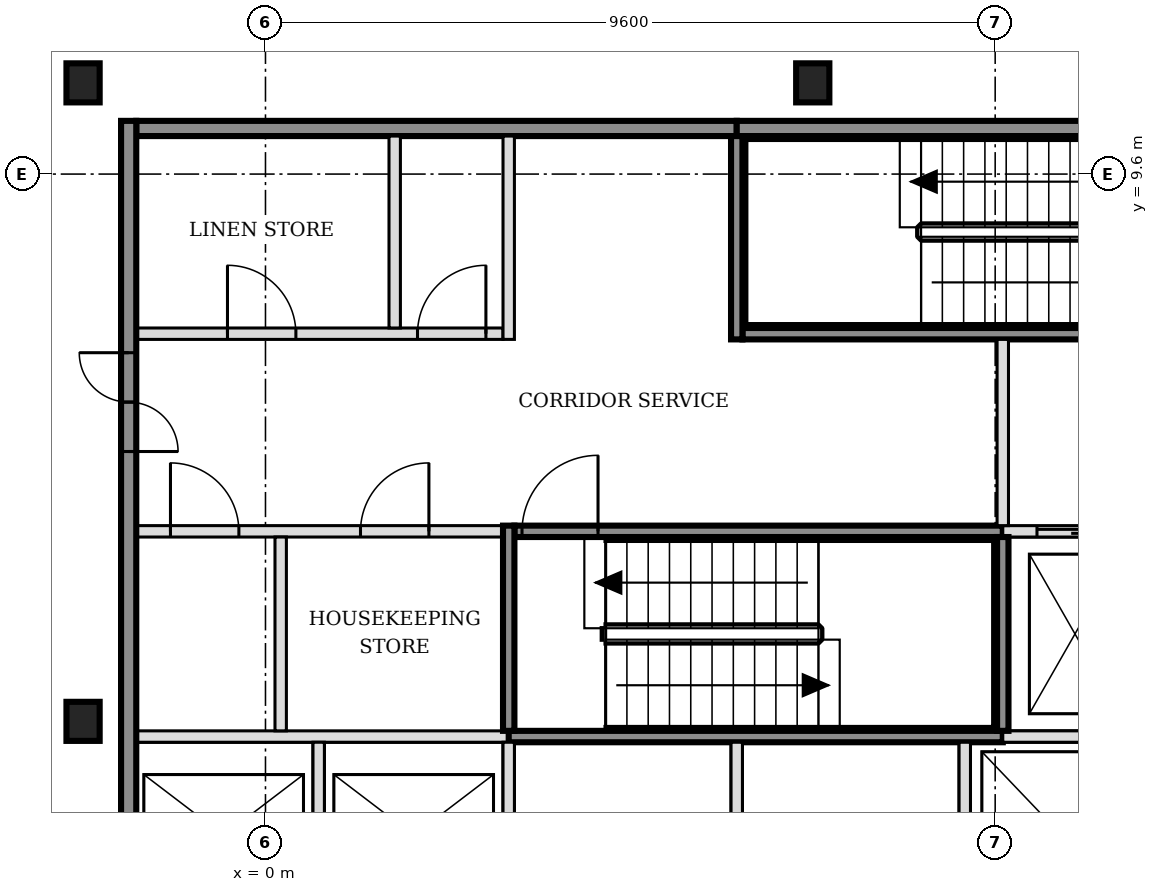
"""IFC4 building model, lengths in metres.
Left out: names, types, materials, properties, quantities, classifications, styles, units other than length and angle.
Written with IfcOpenShell. Run it as: python <this file> out.ifc"""

import sys

from ifc_helpers import new_model, si_unit, direction, frame, frame_2d, origin, origin_2d, place, context, subcontext, project, spatial, rectangle, i_section, extrude, element, fill, save


model = new_model("IFC4")
c1 = context("Model", 3, precision=1e-05, world=origin(), true_north=direction((0.0, 1.0)))
c2 = subcontext(c1, "Body", "Model", "MODEL_VIEW")
j1 = project(units=[si_unit("LENGTHUNIT", "METRE"), si_unit("PLANEANGLEUNIT", "RADIAN")], contexts=[c1])
p1 = place(None, origin())
s1 = spatial("IfcSite", under=j1, at=p1, CompositionType="ELEMENT")
p2 = place(p1, origin())
s2 = spatial("IfcBuilding", under=s1, at=p2, CompositionType="ELEMENT")
p3 = place(p2, frame((0.0, 0.0, 83.4)))
s3 = spatial("IfcBuildingStorey", under=s2, at=p3, CompositionType="ELEMENT", Elevation=83.4)
for number, where, z_axis, x_axis in (
    (1, (-2.4, 2.4, -0.15), (0.0, 0.0, 1.0), (1.0, 0.0, 0.0)),
    (2, (-2.4, 10.8, -0.15), (0.0, 0.0, 1.0), (1.0, 0.0, 0.0)),
    (3, (7.2, 10.8, -0.15), (0.0, 0.0, 1.0), (1.0, 0.0, 0.0)),
):
    element("IfcColumn", number, at=place(p3, frame(where, z_axis=z_axis, x_axis=x_axis)), inside=s3, PredefinedType="COLUMN", context=c2, shape_type="SweptSolid", body=[
        extrude(i_section(OverallWidth=0.437, OverallDepth=0.514, WebThickness=0.061, FlangeThickness=0.097, FilletRadius=0.015, at=origin_2d()), origin(), (0.0, 0.0, 1.0), 3.6),
    ])
p4 = place(p3, frame((-1.7, 2.2, 0.0), z_axis=(0.0, 0.0, 1.0), x_axis=(1.0, 0.0, 0.0)))
e4 = element("IfcWall", 4, at=p4, inside=s3, PredefinedType="SOLIDWALL", context=c2, shape_type="SweptSolid", body=[
    extrude(rectangle(XDim=4.9, YDim=0.15, at=frame_2d((2.45, 0.0))), origin(), (0.0, 0.0, 1.0), 3.45),
])
p5 = place(p3, frame((3.2, 2.2, 0.0), z_axis=(0.0, 0.0, 1.0), x_axis=(1.0, 0.0, 0.0)))
e5 = element("IfcWall", 5, at=p5, inside=s3, PredefinedType="SOLIDWALL", context=c2, shape_type="SweptSolid", body=[
    extrude(rectangle(XDim=6.5, YDim=0.15, at=frame_2d((3.25, 0.0))), origin(), (0.0, 0.0, 1.0), 3.45),
])
p6 = place(p3, frame((9.7, 2.2, 0.0), z_axis=(0.0, 0.0, 1.0), x_axis=(1.0, 0.0, 0.0)))
e6 = element("IfcWall", 6, at=p6, inside=s3, PredefinedType="SOLIDWALL", context=c2, shape_type="SweptSolid", body=[
    extrude(rectangle(XDim=4.525, YDim=0.15, at=frame_2d((2.263, 0.0))), origin(), (0.0, 0.0, 1.0), 3.45),
])
p7 = place(p3, frame((-1.7, 4.9, 0.0), z_axis=(0.0, 0.0, 1.0), x_axis=(1.0, 0.0, 0.0)))
e7 = element("IfcWall", 7, at=p7, inside=s3, PredefinedType="PARTITIONING", context=c2, shape_type="SweptSolid", body=[
    extrude(rectangle(XDim=4.825, YDim=0.15, at=frame_2d((2.413, 0.0))), origin(), (0.0, 0.0, 1.0), 3.45),
])
p8 = place(p7, frame((0.45, 0.0, 0.0)))
e8 = element("IfcOpeningElement", 8, at=p8, cuts=e7, PredefinedType="OPENING", context=c2, shape_type="SweptSolid", body=[
    extrude(rectangle(XDim=0.9, YDim=2.1, at=frame_2d((0.45, 1.05))), frame((0.0, 0.085, 0.0), z_axis=(0.0, -1.0, 0.0), x_axis=(1.0, 0.0, 0.0)), (0.0, 0.0, 1.0), 0.17),
])
p9 = place(p7, frame((2.95, 0.0, 0.0)))
e9 = element("IfcOpeningElement", 9, at=p9, cuts=e7, PredefinedType="OPENING", context=c2, shape_type="SweptSolid", body=[
    extrude(rectangle(XDim=0.9, YDim=2.1, at=frame_2d((0.45, 1.05))), frame((0.0, 0.085, 0.0), z_axis=(0.0, -1.0, 0.0), x_axis=(1.0, 0.0, 0.0)), (0.0, 0.0, 1.0), 0.17),
])
p10 = place(p3, frame((3.275, 4.9, 0.0), z_axis=(0.0, 0.0, 1.0), x_axis=(1.0, 0.0, 0.0)))
e10 = element("IfcWall", 10, at=p10, inside=s3, PredefinedType="SOLIDWALL", context=c2, shape_type="SweptSolid", body=[
    extrude(rectangle(XDim=6.425, YDim=0.15, at=frame_2d((3.212, 0.0))), origin(), (0.0, 0.0, 1.0), 3.45),
])
p11 = place(p10, frame((0.1, 0.0, 0.0)))
e11 = element("IfcOpeningElement", 11, at=p11, cuts=e10, PredefinedType="OPENING", context=c2, shape_type="SweptSolid", body=[
    extrude(rectangle(XDim=1.0, YDim=2.1, at=frame_2d((0.5, 1.05))), frame((0.0, 0.085, 0.0), z_axis=(0.0, -1.0, 0.0), x_axis=(1.0, 0.0, 0.0)), (0.0, 0.0, 1.0), 0.17),
])
p12 = place(p3, frame((9.7, 4.9, 0.0), z_axis=(0.0, 0.0, 1.0), x_axis=(1.0, 0.0, 0.0)))
e12 = element("IfcWall", 12, at=p12, inside=s3, PredefinedType="SOLIDWALL", context=c2, shape_type="SweptSolid", body=[
    extrude(rectangle(XDim=6.4, YDim=0.15, at=frame_2d((3.2, 0.0))), origin(), (0.0, 0.0, 1.0), 3.45),
])
p13 = place(p12, frame((0.45, 0.0, 0.0)))
e13 = element("IfcOpeningElement", 13, at=p13, cuts=e12, PredefinedType="OPENING", context=c2, shape_type="SweptSolid", body=[
    extrude(rectangle(XDim=1.0, YDim=2.1, at=frame_2d((0.5, 1.05))), frame((0.0, 0.085, 0.0), z_axis=(0.0, -1.0, 0.0), x_axis=(1.0, 0.0, 0.0)), (0.0, 0.0, 1.0), 0.17),
])
p14 = place(p12, frame((2.35, 0.0, 0.0)))
e14 = element("IfcOpeningElement", 14, at=p14, cuts=e12, PredefinedType="OPENING", context=c2, shape_type="SweptSolid", body=[
    extrude(rectangle(XDim=1.0, YDim=2.1, at=frame_2d((0.5, 1.05))), frame((0.0, 0.085, 0.0), z_axis=(0.0, -1.0, 0.0), x_axis=(1.0, 0.0, 0.0)), (0.0, 0.0, 1.0), 0.17),
])
p15 = place(p12, frame((4.7, 0.0, 0.0)))
e15 = element("IfcOpeningElement", 15, at=p15, cuts=e12, PredefinedType="OPENING", context=c2, shape_type="SweptSolid", body=[
    extrude(rectangle(XDim=0.9, YDim=2.1, at=frame_2d((0.45, 1.05))), frame((0.0, 0.085, 0.0), z_axis=(0.0, -1.0, 0.0), x_axis=(1.0, 0.0, 0.0)), (0.0, 0.0, 1.0), 0.17),
])
p16 = place(p3, frame((-1.7, 7.5, 0.0), z_axis=(0.0, 0.0, 1.0), x_axis=(1.0, 0.0, 0.0)))
e16 = element("IfcWall", 16, at=p16, inside=s3, PredefinedType="PARTITIONING", context=c2, shape_type="SweptSolid", body=[
    extrude(rectangle(XDim=4.825, YDim=0.15, at=frame_2d((2.413, 0.0))), origin(), (0.0, 0.0, 1.0), 3.45),
])
p17 = place(p16, frame((1.2, 0.0, 0.0)))
e17 = element("IfcOpeningElement", 17, at=p17, cuts=e16, PredefinedType="OPENING", context=c2, shape_type="SweptSolid", body=[
    extrude(rectangle(XDim=0.9, YDim=2.1, at=frame_2d((0.45, 1.05))), frame((0.0, 0.085, 0.0), z_axis=(0.0, -1.0, 0.0), x_axis=(1.0, 0.0, 0.0)), (0.0, 0.0, 1.0), 0.17),
])
p18 = place(p16, frame((3.7, 0.0, 0.0)))
e18 = element("IfcOpeningElement", 18, at=p18, cuts=e16, PredefinedType="OPENING", context=c2, shape_type="SweptSolid", body=[
    extrude(rectangle(XDim=0.9, YDim=2.1, at=frame_2d((0.45, 1.05))), frame((0.0, 0.085, 0.0), z_axis=(0.0, -1.0, 0.0), x_axis=(1.0, 0.0, 0.0)), (0.0, 0.0, 1.0), 0.17),
])
p19 = place(p3, frame((6.275, 7.5, 0.0), z_axis=(0.0, 0.0, 1.0), x_axis=(1.0, 0.0, 0.0)))
e19 = element("IfcWall", 19, at=p19, inside=s3, PredefinedType="SOLIDWALL", context=c2, shape_type="SweptSolid", body=[
    extrude(rectangle(XDim=6.425, YDim=0.15, at=frame_2d((3.212, 0.0))), origin(), (0.0, 0.0, 1.0), 3.45),
])
p20 = place(p19, frame((5.225, 0.0, 0.0)))
e20 = element("IfcOpeningElement", 20, at=p20, cuts=e19, PredefinedType="OPENING", context=c2, shape_type="SweptSolid", body=[
    extrude(rectangle(XDim=1.0, YDim=2.1, at=frame_2d((0.5, 1.05))), frame((0.0, 0.085, 0.0), z_axis=(0.0, -1.0, 0.0), x_axis=(1.0, 0.0, 0.0)), (0.0, 0.0, 1.0), 0.17),
])
p21 = place(p3, frame((-1.7, 10.2, 0.0), z_axis=(0.0, 0.0, 1.0), x_axis=(1.0, 0.0, 0.0)))
e21 = element("IfcWall", 21, at=p21, inside=s3, PredefinedType="SOLIDWALL", context=c2, shape_type="SweptSolid", body=[
    extrude(rectangle(XDim=7.9, YDim=0.2, at=frame_2d((3.95, 0.0))), origin(), (0.0, 0.0, 1.0), 3.45),
])
p22 = place(p3, frame((6.2, 10.2, 0.0), z_axis=(0.0, 0.0, 1.0), x_axis=(1.0, 0.0, 0.0)))
e22 = element("IfcWall", 22, at=p22, inside=s3, PredefinedType="SOLIDWALL", context=c2, shape_type="SweptSolid", body=[
    extrude(rectangle(XDim=6.5, YDim=0.2, at=frame_2d((3.25, 0.0))), origin(), (0.0, 0.0, 1.0), 3.45),
])
p23 = place(p3, frame((-1.8, -5.5, 0.0), z_axis=(0.0, 0.0, 1.0), x_axis=(0.0, 1.0, 0.0)))
e23 = element("IfcWall", 23, at=p23, inside=s3, PredefinedType="SOLIDWALL", context=c2, shape_type="SweptSolid", body=[
    extrude(rectangle(XDim=15.8, YDim=0.2, at=frame_2d((7.9, 0.0))), origin(), (0.0, 0.0, 1.0), 3.45),
])
p24 = place(p23, frame((3.05, 0.0, 0.0)))
e24 = element("IfcOpeningElement", 24, at=p24, cuts=e23, PredefinedType="OPENING", context=c2, shape_type="SweptSolid", body=[
    extrude(rectangle(XDim=1.3, YDim=2.1, at=frame_2d((0.65, 1.05))), frame((0.0, 0.11, 0.0), z_axis=(0.0, -1.0, 0.0), x_axis=(1.0, 0.0, 0.0)), (0.0, 0.0, 1.0), 0.22),
])
p25 = place(p23, frame((11.45, 0.0, 0.0)))
e25 = element("IfcOpeningElement", 25, at=p25, cuts=e23, PredefinedType="OPENING", context=c2, shape_type="SweptSolid", body=[
    extrude(rectangle(XDim=1.3, YDim=2.1, at=frame_2d((0.65, 1.05))), frame((0.0, 0.11, 0.0), z_axis=(0.0, -1.0, 0.0), x_axis=(1.0, 0.0, 0.0)), (0.0, 0.0, 1.0), 0.22),
])
p26 = place(p3, frame((0.2, 2.275, 0.0), z_axis=(0.0, 0.0, 1.0), x_axis=(0.0, 1.0, 0.0)))
e26 = element("IfcWall", 26, at=p26, inside=s3, PredefinedType="PARTITIONING", context=c2, shape_type="SweptSolid", body=[
    extrude(rectangle(XDim=2.55, YDim=0.15, at=frame_2d((1.275, 0.0))), origin(), (0.0, 0.0, 1.0), 3.45),
])
p27 = place(p3, frame((0.7, -0.325, 0.0), z_axis=(0.0, 0.0, 1.0), x_axis=(0.0, 1.0, 0.0)))
e27 = element("IfcWall", 27, at=p27, inside=s3, PredefinedType="SOLIDWALL", context=c2, shape_type="SweptSolid", body=[
    extrude(rectangle(XDim=2.45, YDim=0.15, at=frame_2d((1.225, 0.0))), origin(), (0.0, 0.0, 1.0), 3.45),
])
p28 = place(p3, frame((1.7, 7.575, 0.0), z_axis=(0.0, 0.0, 1.0), x_axis=(0.0, 1.0, 0.0)))
e28 = element("IfcWall", 28, at=p28, inside=s3, PredefinedType="PARTITIONING", context=c2, shape_type="SweptSolid", body=[
    extrude(rectangle(XDim=2.525, YDim=0.15, at=frame_2d((1.263, 0.0))), origin(), (0.0, 0.0, 1.0), 3.45),
])
p29 = place(p3, frame((3.2, -0.325, 0.0), z_axis=(0.0, 0.0, 1.0), x_axis=(0.0, 1.0, 0.0)))
e29 = element("IfcWall", 29, at=p29, inside=s3, PredefinedType="SOLIDWALL", context=c2, shape_type="SweptSolid", body=[
    extrude(rectangle(XDim=2.45, YDim=0.15, at=frame_2d((1.225, 0.0))), origin(), (0.0, 0.0, 1.0), 3.45),
])
p30 = place(p3, frame((3.2, 2.275, 0.0), z_axis=(0.0, 0.0, 1.0), x_axis=(0.0, 1.0, 0.0)))
e30 = element("IfcWall", 30, at=p30, inside=s3, PredefinedType="SOLIDWALL", context=c2, shape_type="SweptSolid", body=[
    extrude(rectangle(XDim=2.7, YDim=0.15, at=frame_2d((1.35, 0.0))), origin(), (0.0, 0.0, 1.0), 3.45),
])
p31 = place(p3, frame((3.2, 7.425, 0.0), z_axis=(0.0, 0.0, 1.0), x_axis=(0.0, 1.0, 0.0)))
e31 = element("IfcWall", 31, at=p31, inside=s3, PredefinedType="PARTITIONING", context=c2, shape_type="SweptSolid", body=[
    extrude(rectangle(XDim=2.675, YDim=0.15, at=frame_2d((1.337, 0.0))), origin(), (0.0, 0.0, 1.0), 3.45),
])
p32 = place(p3, frame((6.2, -0.325, 0.0), z_axis=(0.0, 0.0, 1.0), x_axis=(0.0, 1.0, 0.0)))
e32 = element("IfcWall", 32, at=p32, inside=s3, PredefinedType="SOLIDWALL", context=c2, shape_type="SweptSolid", body=[
    extrude(rectangle(XDim=2.45, YDim=0.15, at=frame_2d((1.225, 0.0))), origin(), (0.0, 0.0, 1.0), 3.45),
])
p33 = place(p3, frame((6.2, 7.425, 0.0), z_axis=(0.0, 0.0, 1.0), x_axis=(0.0, 1.0, 0.0)))
e33 = element("IfcWall", 33, at=p33, inside=s3, PredefinedType="SOLIDWALL", context=c2, shape_type="SweptSolid", body=[
    extrude(rectangle(XDim=2.675, YDim=0.15, at=frame_2d((1.337, 0.0))), origin(), (0.0, 0.0, 1.0), 3.45),
])
p34 = place(p3, frame((9.2, -0.325, 0.0), z_axis=(0.0, 0.0, 1.0), x_axis=(0.0, 1.0, 0.0)))
e34 = element("IfcWall", 34, at=p34, inside=s3, PredefinedType="SOLIDWALL", context=c2, shape_type="SweptSolid", body=[
    extrude(rectangle(XDim=2.45, YDim=0.15, at=frame_2d((1.225, 0.0))), origin(), (0.0, 0.0, 1.0), 3.45),
])
p35 = place(p3, frame((9.7, 2.275, 0.0), z_axis=(0.0, 0.0, 1.0), x_axis=(0.0, 1.0, 0.0)))
e35 = element("IfcWall", 35, at=p35, inside=s3, PredefinedType="SOLIDWALL", context=c2, shape_type="SweptSolid", body=[
    extrude(rectangle(XDim=2.55, YDim=0.15, at=frame_2d((1.275, 0.0))), origin(), (0.0, 0.0, 1.0), 3.45),
])
p36 = place(p3, frame((9.7, 4.975, 0.0), z_axis=(0.0, 0.0, 1.0), x_axis=(0.0, 1.0, 0.0)))
e36 = element("IfcWall", 36, at=p36, inside=s3, PredefinedType="SOLIDWALL", context=c2, shape_type="SweptSolid", body=[
    extrude(rectangle(XDim=2.45, YDim=0.15, at=frame_2d((1.225, 0.0))), origin(), (0.0, 0.0, 1.0), 3.45),
])
p37 = place(p13, origin())
e37 = element("IfcDoor", 37, at=p37, inside=s3, OperationType="DOUBLE_DOOR_SLIDING", PredefinedType="DOOR", context=c2, shape_type="SweptSolid", body=[
    extrude(rectangle(XDim=1.0, YDim=2.1, at=frame_2d((0.5, 1.05))), frame((0.0, 0.025, 0.0), z_axis=(0.0, -1.0, 0.0), x_axis=(1.0, 0.0, 0.0)), (0.0, 0.0, 1.0), 0.05),
])
fill(e13, e37)
p38 = place(p11, origin())
e38 = element("IfcDoor", 38, at=p38, inside=s3, OperationType="SINGLE_SWING_RIGHT", PredefinedType="DOOR", context=c2, shape_type="SweptSolid", body=[
    extrude(rectangle(XDim=1.0, YDim=2.1, at=frame_2d((0.5, 1.05))), frame((0.0, 0.025, 0.0), z_axis=(0.0, -1.0, 0.0), x_axis=(1.0, 0.0, 0.0)), (0.0, 0.0, 1.0), 0.05),
])
fill(e11, e38)
p39 = place(p25, origin())
e39 = element("IfcDoor", 39, at=p39, inside=s3, OperationType="DOUBLE_DOOR_SINGLE_SWING", PredefinedType="DOOR", context=c2, shape_type="SweptSolid", body=[
    extrude(rectangle(XDim=1.3, YDim=2.1, at=frame_2d((0.65, 1.05))), frame((0.0, 0.025, 0.0), z_axis=(0.0, -1.0, 0.0), x_axis=(1.0, 0.0, 0.0)), (0.0, 0.0, 1.0), 0.05),
])
fill(e25, e39)
p40 = place(p8, origin())
e40 = element("IfcDoor", 40, at=p40, inside=s3, OperationType="SINGLE_SWING_LEFT", PredefinedType="DOOR", context=c2, shape_type="SweptSolid", body=[
    extrude(rectangle(XDim=0.9, YDim=2.1, at=frame_2d((0.45, 1.05))), frame((0.0, 0.025, 0.0), z_axis=(0.0, -1.0, 0.0), x_axis=(1.0, 0.0, 0.0)), (0.0, 0.0, 1.0), 0.05),
])
fill(e8, e40)
p41 = place(p9, origin())
e41 = element("IfcDoor", 41, at=p41, inside=s3, OperationType="SINGLE_SWING_RIGHT", PredefinedType="DOOR", context=c2, shape_type="SweptSolid", body=[
    extrude(rectangle(XDim=0.9, YDim=2.1, at=frame_2d((0.45, 1.05))), frame((0.0, 0.025, 0.0), z_axis=(0.0, -1.0, 0.0), x_axis=(1.0, 0.0, 0.0)), (0.0, 0.0, 1.0), 0.05),
])
fill(e9, e41)
p42 = place(p17, origin())
e42 = element("IfcDoor", 42, at=p42, inside=s3, OperationType="SINGLE_SWING_LEFT", PredefinedType="DOOR", context=c2, shape_type="SweptSolid", body=[
    extrude(rectangle(XDim=0.9, YDim=2.1, at=frame_2d((0.45, 1.05))), frame((0.0, 0.025, 0.0), z_axis=(0.0, -1.0, 0.0), x_axis=(1.0, 0.0, 0.0)), (0.0, 0.0, 1.0), 0.05),
])
fill(e17, e42)
p43 = place(p18, origin())
e43 = element("IfcDoor", 43, at=p43, inside=s3, OperationType="SINGLE_SWING_RIGHT", PredefinedType="DOOR", context=c2, shape_type="SweptSolid", body=[
    extrude(rectangle(XDim=0.9, YDim=2.1, at=frame_2d((0.45, 1.05))), frame((0.0, 0.025, 0.0), z_axis=(0.0, -1.0, 0.0), x_axis=(1.0, 0.0, 0.0)), (0.0, 0.0, 1.0), 0.05),
])
fill(e18, e43)
save(model, sys.argv[1])
